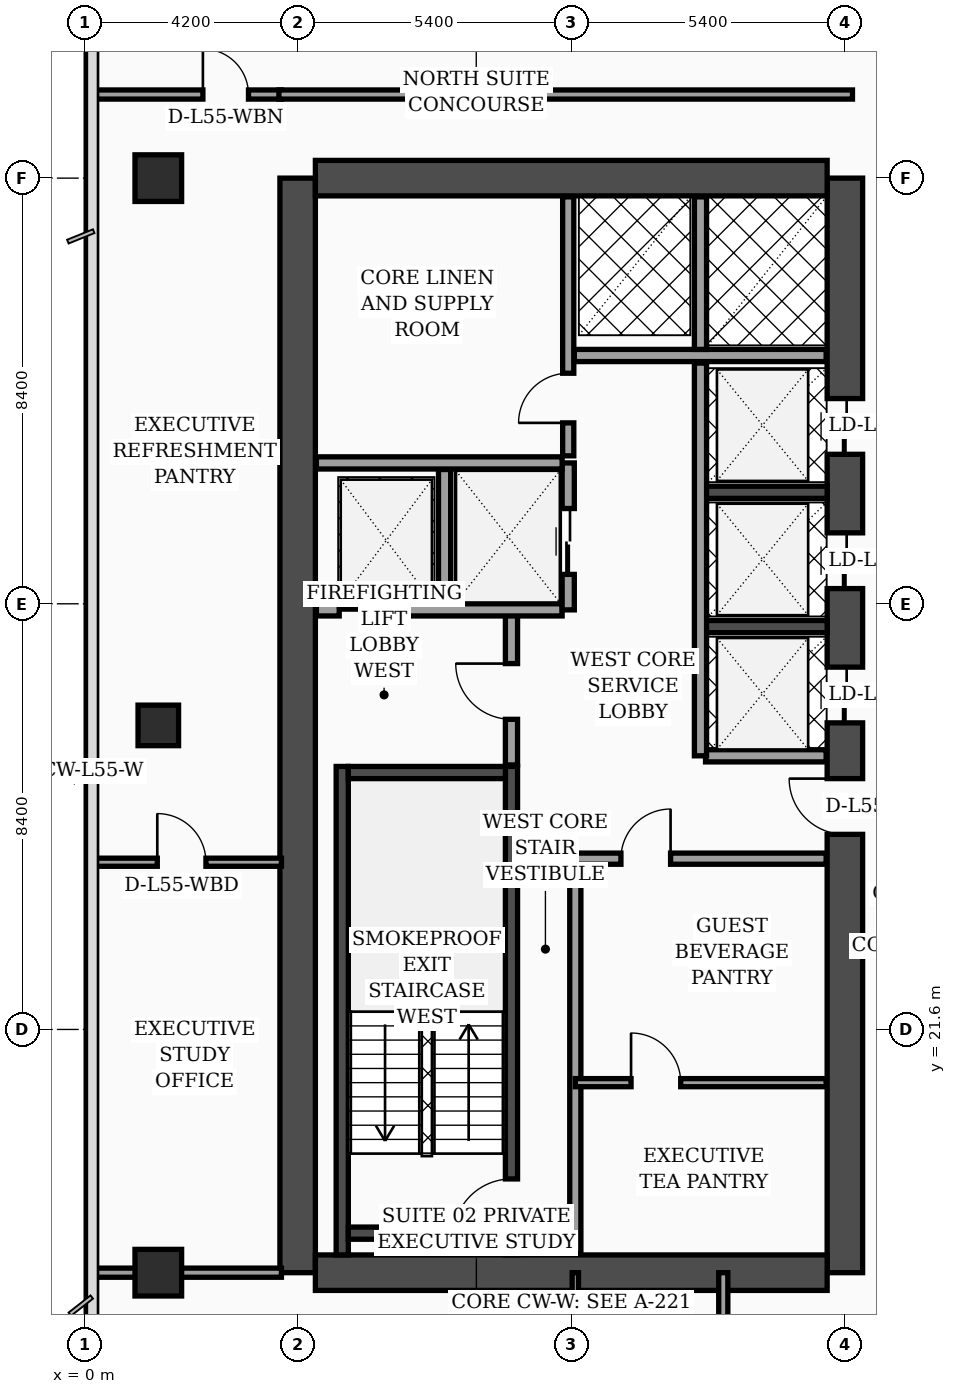
"""IFC4 building model, lengths in metres.
Left out: names, types, materials, properties, quantities, classifications, styles, units other than length and angle.
Written with IfcOpenShell. Run it as: python <this file> out.ifc"""

import sys

from ifc_helpers import new_model, si_unit, direction, frame, frame_2d, origin, origin_2d, place, context, subcontext, project, spatial, rectangle, extrude, element, fill, save


model = new_model("IFC4")
c1 = context("Model", 3, precision=1e-05, world=origin(), true_north=direction((0.0, 1.0)))
c2 = subcontext(c1, "Body", "Model", "MODEL_VIEW")
j1 = project(units=[si_unit("LENGTHUNIT", "METRE"), si_unit("PLANEANGLEUNIT", "RADIAN")], contexts=[c1])
p1 = place(None, origin())
s1 = spatial("IfcSite", under=j1, at=p1, CompositionType="ELEMENT")
p2 = place(p1, origin())
s2 = spatial("IfcBuilding", under=s1, at=p2, CompositionType="ELEMENT")
p3 = place(p2, frame((0.0, 0.0, 223.1)))
s3 = spatial("IfcBuildingStorey", under=s2, at=p3, CompositionType="ELEMENT", Elevation=223.1)
p4 = place(p3, frame((4.2, 16.8, 0.0), z_axis=(0.0, 0.0, 1.0), x_axis=(0.0, 1.0, 0.0)))
e1 = element("IfcWall", 1, at=p4, inside=s3, PredefinedType="SHEAR", context=c2, shape_type="SweptSolid", body=[
    extrude(rectangle(XDim=21.6, YDim=0.7, at=frame_2d((10.8, 0.0))), origin(), (0.0, 0.0, 1.0), 3.56),
])
p5 = place(p3, frame((15.0, 16.8, 0.0), z_axis=(0.0, 0.0, 1.0), x_axis=(0.0, 1.0, 0.0)))
e2 = element("IfcWall", 2, at=p5, inside=s3, PredefinedType="SHEAR", context=c2, shape_type="SweptSolid", body=[
    extrude(rectangle(XDim=21.6, YDim=0.7, at=frame_2d((10.8, 0.0))), origin(), (0.0, 0.0, 1.0), 3.56),
])
p6 = place(p5, frame((8.65, 0.0, 0.0)))
e3 = element("IfcOpeningElement", 3, at=p6, cuts=e2, PredefinedType="OPENING", context=c2, shape_type="SweptSolid", body=[
    extrude(rectangle(XDim=1.1, YDim=2.2, at=frame_2d((0.55, 1.1))), frame((0.0, 0.36, 0.0), z_axis=(0.0, -1.0, 0.0), x_axis=(1.0, 0.0, 0.0)), (0.0, 0.0, 1.0), 0.72),
])
p7 = place(p5, frame((10.85, 0.0, 0.0)))
e4 = element("IfcOpeningElement", 4, at=p7, cuts=e2, PredefinedType="OPENING", context=c2, shape_type="SweptSolid", body=[
    extrude(rectangle(XDim=1.1, YDim=2.2, at=frame_2d((0.55, 1.1))), frame((0.0, 0.36, 0.0), z_axis=(0.0, -1.0, 0.0), x_axis=(1.0, 0.0, 0.0)), (0.0, 0.0, 1.0), 0.72),
])
p8 = place(p5, frame((13.5, 0.0, 0.0)))
e5 = element("IfcOpeningElement", 5, at=p8, cuts=e2, PredefinedType="OPENING", context=c2, shape_type="SweptSolid", body=[
    extrude(rectangle(XDim=1.1, YDim=2.2, at=frame_2d((0.55, 1.1))), frame((0.0, 0.36, 0.0), z_axis=(0.0, -1.0, 0.0), x_axis=(1.0, 0.0, 0.0)), (0.0, 0.0, 1.0), 0.72),
])
p9 = place(p5, frame((16.15, 0.0, 0.0)))
e6 = element("IfcOpeningElement", 6, at=p9, cuts=e2, PredefinedType="OPENING", context=c2, shape_type="SweptSolid", body=[
    extrude(rectangle(XDim=1.1, YDim=2.2, at=frame_2d((0.55, 1.1))), frame((0.0, 0.36, 0.0), z_axis=(0.0, -1.0, 0.0), x_axis=(1.0, 0.0, 0.0)), (0.0, 0.0, 1.0), 0.72),
])
for number, where, z_axis, x_axis in (
    (7, (4.55, 38.4, 0.0), (0.0, 0.0, 1.0), (1.0, 0.0, 0.0)),
    (8, (4.55, 16.8, 0.0), (0.0, 0.0, 1.0), (1.0, 0.0, 0.0)),
):
    element("IfcWall", number, at=place(p3, frame(where, z_axis=z_axis, x_axis=x_axis)), inside=s3, PredefinedType="SHEAR", context=c2, shape_type="SweptSolid", body=[
        extrude(rectangle(XDim=10.1, YDim=0.7, at=frame_2d((5.05, 0.0))), origin(), (0.0, 0.0, 1.0), 3.56),
    ])
p10 = place(p3, frame((5.08, 17.15, 0.0), z_axis=(0.0, 0.0, 1.0), x_axis=(0.0, 1.0, 0.0)))
e9 = element("IfcWall", 9, at=p10, inside=s3, PredefinedType="SOLIDWALL", context=c2, shape_type="SweptSolid", body=[
    extrude(rectangle(XDim=9.64, YDim=0.24, at=frame_2d((4.82, 0.0))), origin(), (0.0, 0.0, 1.0), 3.56),
])
p11 = place(p3, frame((8.42, 17.15, 0.0), z_axis=(0.0, 0.0, 1.0), x_axis=(0.0, 1.0, 0.0)))
e10 = element("IfcWall", 10, at=p11, inside=s3, PredefinedType="SOLIDWALL", context=c2, shape_type="SweptSolid", body=[
    extrude(rectangle(XDim=9.64, YDim=0.24, at=frame_2d((4.82, 0.0))), origin(), (0.0, 0.0, 1.0), 3.56),
])
p12 = place(p11, frame((0.35, 0.0, 0.0)))
e11 = element("IfcOpeningElement", 11, at=p12, cuts=e10, PredefinedType="OPENING", context=c2, shape_type="SweptSolid", body=[
    extrude(rectangle(XDim=1.15, YDim=2.2, at=frame_2d((0.575, 1.1))), frame((0.0, 0.13, 0.0), z_axis=(0.0, -1.0, 0.0), x_axis=(1.0, 0.0, 0.0)), (0.0, 0.0, 1.0), 0.26),
])
for number, where, z_axis, x_axis in (
    (12, (5.2, 17.58, 0.0), (0.0, 0.0, 1.0), (1.0, 0.0, 0.0)),
    (13, (5.2, 26.67, 0.0), (0.0, 0.0, 1.0), (1.0, 0.0, 0.0)),
):
    element("IfcWall", number, at=place(p3, frame(where, z_axis=z_axis, x_axis=x_axis)), inside=s3, PredefinedType="SOLIDWALL", context=c2, shape_type="SweptSolid", body=[
        extrude(rectangle(XDim=3.1, YDim=0.24, at=frame_2d((1.55, 0.0))), origin(), (0.0, 0.0, 1.0), 3.56),
    ])
for number, where, z_axis, x_axis in (
    (14, (12.18, 29.55, 0.0), (0.0, 0.0, 1.0), (1.0, 0.0, 0.0)),
    (15, (12.18, 32.2, 0.0), (0.0, 0.0, 1.0), (1.0, 0.0, 0.0)),
):
    element("IfcWall", number, at=place(p3, frame(where, z_axis=z_axis, x_axis=x_axis)), inside=s3, PredefinedType="SOLIDWALL", context=c2, shape_type="SweptSolid", body=[
        extrude(rectangle(XDim=2.47, YDim=0.24, at=frame_2d((1.235, 0.0))), origin(), (0.0, 0.0, 1.0), 3.56),
    ])
p13 = place(p3, frame((1.45, 16.8, 0.0), z_axis=(0.0, 0.0, 1.0), x_axis=(1.0, 0.0, 0.0)))
e16 = element("IfcColumn", 16, at=p13, inside=s3, PredefinedType="COLUMN", context=c2, shape_type="SweptSolid", body=[
    extrude(rectangle(XDim=0.92, YDim=0.92, at=origin_2d()), origin(), (0.0, 0.0, 1.0), 3.56),
])
p14 = place(p3, frame((1.45, 27.6, 0.0), z_axis=(0.0, 0.0, 1.0), x_axis=(1.0, 0.0, 0.0)))
e17 = element("IfcColumn", 17, at=p14, inside=s3, PredefinedType="COLUMN", context=c2, shape_type="SweptSolid", body=[
    extrude(rectangle(XDim=0.8, YDim=0.8, at=origin_2d()), origin(), (0.0, 0.0, 1.0), 3.56),
])
p15 = place(p3, frame((1.45, 38.4, 0.0), z_axis=(0.0, 0.0, 1.0), x_axis=(1.0, 0.0, 0.0)))
e18 = element("IfcColumn", 18, at=p15, inside=s3, PredefinedType="COLUMN", context=c2, shape_type="SweptSolid", body=[
    extrude(rectangle(XDim=0.92, YDim=0.92, at=origin_2d()), origin(), (0.0, 0.0, 1.0), 3.56),
])
p16 = place(p3, frame((8.42, 26.82, 0.0), z_axis=(0.0, 0.0, 1.0), x_axis=(0.0, 1.0, 0.0)))
e19 = element("IfcWall", 19, at=p16, inside=s3, PredefinedType="SOLIDWALL", context=c2, shape_type="SweptSolid", body=[
    extrude(rectangle(XDim=3.0, YDim=0.24, at=frame_2d((1.5, 0.0))), origin(), (0.0, 0.0, 1.0), 3.56),
])
p17 = place(p16, frame((0.9, 0.0, 0.0)))
e20 = element("IfcOpeningElement", 20, at=p17, cuts=e19, PredefinedType="OPENING", context=c2, shape_type="SweptSolid", body=[
    extrude(rectangle(XDim=1.1, YDim=2.2, at=frame_2d((0.55, 1.1))), frame((0.0, 0.13, 0.0), z_axis=(0.0, -1.0, 0.0), x_axis=(1.0, 0.0, 0.0)), (0.0, 0.0, 1.0), 0.26),
])
p18 = place(p3, frame((4.57, 29.88, 0.0), z_axis=(0.0, 0.0, 1.0), x_axis=(1.0, 0.0, 0.0)))
e21 = element("IfcWall", 21, at=p18, inside=s3, PredefinedType="SOLIDWALL", context=c2, shape_type="SweptSolid", body=[
    extrude(rectangle(XDim=4.85, YDim=0.24, at=frame_2d((2.425, 0.0))), origin(), (0.0, 0.0, 1.0), 3.56),
])
p19 = place(p18, frame((0.45, 0.0, 0.0)))
e22 = element("IfcOpeningElement", 22, at=p19, cuts=e21, PredefinedType="OPENING", context=c2, shape_type="SweptSolid", body=[
    extrude(rectangle(XDim=1.3, YDim=2.35, at=frame_2d((0.65, 1.175))), frame((0.0, 0.13, 0.0), z_axis=(0.0, -1.0, 0.0), x_axis=(1.0, 0.0, 0.0)), (0.0, 0.0, 1.0), 0.26),
])
p20 = place(p3, frame((7.1, 30.02, 0.0), z_axis=(0.0, 0.0, 1.0), x_axis=(0.0, 1.0, 0.0)))
e23 = element("IfcWall", 23, at=p20, inside=s3, PredefinedType="SOLIDWALL", context=c2, shape_type="SweptSolid", body=[
    extrude(rectangle(XDim=2.63, YDim=0.24, at=frame_2d((1.315, 0.0))), origin(), (0.0, 0.0, 1.0), 3.56),
])
p21 = place(p3, frame((9.54, 29.88, 0.0), z_axis=(0.0, 0.0, 1.0), x_axis=(0.0, 1.0, 0.0)))
e24 = element("IfcWall", 24, at=p21, inside=s3, PredefinedType="SOLIDWALL", context=c2, shape_type="SweptSolid", body=[
    extrude(rectangle(XDim=2.9, YDim=0.24, at=frame_2d((1.45, 0.0))), origin(), (0.0, 0.0, 1.0), 3.56),
])
p22 = place(p21, frame((0.7, 0.0, 0.0)))
e25 = element("IfcOpeningElement", 25, at=p22, cuts=e24, PredefinedType="OPENING", context=c2, shape_type="SweptSolid", body=[
    extrude(rectangle(XDim=1.3, YDim=2.35, at=frame_2d((0.65, 1.175))), frame((0.0, 0.13, 0.0), z_axis=(0.0, -1.0, 0.0), x_axis=(1.0, 0.0, 0.0)), (0.0, 0.0, 1.0), 0.26),
])
p23 = place(p3, frame((4.57, 32.78, 0.0), z_axis=(0.0, 0.0, 1.0), x_axis=(1.0, 0.0, 0.0)))
e26 = element("IfcWall", 26, at=p23, inside=s3, PredefinedType="SOLIDWALL", context=c2, shape_type="SweptSolid", body=[
    extrude(rectangle(XDim=4.85, YDim=0.24, at=frame_2d((2.425, 0.0))), origin(), (0.0, 0.0, 1.0), 3.19),
])
p24 = place(p3, frame((9.68, 17.17, 0.0), z_axis=(0.0, 0.0, 1.0), x_axis=(0.0, 1.0, 0.0)))
e27 = element("IfcWall", 27, at=p24, inside=s3, PredefinedType="SOLIDWALL", context=c2, shape_type="SweptSolid", body=[
    extrude(rectangle(XDim=7.83, YDim=0.22, at=frame_2d((3.915, 0.0))), origin(), (0.0, 0.0, 1.0), 3.56),
])
p25 = place(p3, frame((9.54, 32.92, 0.0), z_axis=(0.0, 0.0, 1.0), x_axis=(0.0, 1.0, 0.0)))
e28 = element("IfcWall", 28, at=p25, inside=s3, PredefinedType="SOLIDWALL", context=c2, shape_type="SweptSolid", body=[
    extrude(rectangle(XDim=5.11, YDim=0.22, at=frame_2d((2.555, 0.0))), origin(), (0.0, 0.0, 1.0), 3.56),
])
p26 = place(p25, frame((0.65, 0.0, 0.0)))
e29 = element("IfcOpeningElement", 29, at=p26, cuts=e28, PredefinedType="OPENING", context=c2, shape_type="SweptSolid", body=[
    extrude(rectangle(XDim=0.98, YDim=2.15, at=frame_2d((0.49, 1.075))), frame((0.0, 0.12, 0.0), z_axis=(0.0, -1.0, 0.0), x_axis=(1.0, 0.0, 0.0)), (0.0, 0.0, 1.0), 0.24),
])
p27 = place(p3, frame((9.68, 20.55, 0.0), z_axis=(0.0, 0.0, 1.0), x_axis=(1.0, 0.0, 0.0)))
e30 = element("IfcWall", 30, at=p27, inside=s3, PredefinedType="PARTITIONING", context=c2, shape_type="SweptSolid", body=[
    extrude(rectangle(XDim=4.95, YDim=0.16, at=frame_2d((2.475, 0.0))), origin(), (0.0, 0.0, 1.0), 3.56),
])
p28 = place(p27, frame((1.1, 0.0, 0.0)))
e31 = element("IfcOpeningElement", 31, at=p28, cuts=e30, PredefinedType="OPENING", context=c2, shape_type="SweptSolid", body=[
    extrude(rectangle(XDim=0.98, YDim=2.15, at=frame_2d((0.49, 1.075))), frame((0.0, 0.09, 0.0), z_axis=(0.0, -1.0, 0.0), x_axis=(1.0, 0.0, 0.0)), (0.0, 0.0, 1.0), 0.18),
])
p29 = place(p3, frame((9.68, 24.97, 0.0), z_axis=(0.0, 0.0, 1.0), x_axis=(1.0, 0.0, 0.0)))
e32 = element("IfcWall", 32, at=p29, inside=s3, PredefinedType="SOLIDWALL", context=c2, shape_type="SweptSolid", body=[
    extrude(rectangle(XDim=4.95, YDim=0.22, at=frame_2d((2.475, 0.0))), origin(), (0.0, 0.0, 1.0), 2.94),
])
p30 = place(p29, frame((0.9, 0.0, 0.0)))
e33 = element("IfcOpeningElement", 33, at=p30, cuts=e32, PredefinedType="OPENING", context=c2, shape_type="SweptSolid", body=[
    extrude(rectangle(XDim=0.98, YDim=2.15, at=frame_2d((0.49, 1.075))), frame((0.0, 0.12, 0.0), z_axis=(0.0, -1.0, 0.0), x_axis=(1.0, 0.0, 0.0)), (0.0, 0.0, 1.0), 0.24),
])
p31 = place(p3, frame((12.25, 27.0, 0.0), z_axis=(0.0, 0.0, 1.0), x_axis=(1.0, 0.0, 0.0)))
e34 = element("IfcWall", 34, at=p31, inside=s3, PredefinedType="SOLIDWALL", context=c2, shape_type="SweptSolid", body=[
    extrude(rectangle(XDim=2.38, YDim=0.24, at=frame_2d((1.19, 0.0))), origin(), (0.0, 0.0, 1.0), 3.56),
])
p32 = place(p3, frame((12.15, 27.0, 0.0), z_axis=(0.0, 0.0, 1.0), x_axis=(0.0, 1.0, 0.0)))
e35 = element("IfcWall", 35, at=p32, inside=s3, PredefinedType="SOLIDWALL", context=c2, shape_type="SweptSolid", body=[
    extrude(rectangle(XDim=7.75, YDim=0.24, at=frame_2d((3.875, 0.0))), origin(), (0.0, 0.0, 1.0), 3.56),
])
p33 = place(p3, frame((9.66, 34.9, 0.0), z_axis=(0.0, 0.0, 1.0), x_axis=(1.0, 0.0, 0.0)))
e36 = element("IfcWall", 36, at=p33, inside=s3, PredefinedType="SOLIDWALL", context=c2, shape_type="SweptSolid", body=[
    extrude(rectangle(XDim=4.97, YDim=0.24, at=frame_2d((2.485, 0.0))), origin(), (0.0, 0.0, 1.0), 3.56),
])
p34 = place(p3, frame((12.15, 35.02, 0.0), z_axis=(0.0, 0.0, 1.0), x_axis=(0.0, 1.0, 0.0)))
e37 = element("IfcWall", 37, at=p34, inside=s3, PredefinedType="SOLIDWALL", context=c2, shape_type="SweptSolid", body=[
    extrude(rectangle(XDim=3.01, YDim=0.24, at=frame_2d((1.505, 0.0))), origin(), (0.0, 0.0, 1.0), 3.56),
])
p35 = place(p3, frame((0.08, 24.9, 0.0), z_axis=(0.0, 0.0, 1.0), x_axis=(1.0, 0.0, 0.0)))
e38 = element("IfcWall", 38, at=p35, inside=s3, PredefinedType="PARTITIONING", context=c2, shape_type="SweptSolid", body=[
    extrude(rectangle(XDim=3.8, YDim=0.16, at=frame_2d((1.9, 0.0))), origin(), (0.0, 0.0, 1.0), 3.09),
])
p36 = place(p35, frame((1.35, 0.0, 0.0)))
e39 = element("IfcOpeningElement", 39, at=p36, cuts=e38, PredefinedType="OPENING", context=c2, shape_type="SweptSolid", body=[
    extrude(rectangle(XDim=0.96, YDim=2.2, at=frame_2d((0.48, 1.1))), frame((0.0, 0.09, 0.0), z_axis=(0.0, -1.0, 0.0), x_axis=(1.0, 0.0, 0.0)), (0.0, 0.0, 1.0), 0.18),
])
p37 = place(p3, frame((0.08, 16.8, 0.0), z_axis=(0.0, 0.0, 1.0), x_axis=(1.0, 0.0, 0.0)))
e40 = element("IfcWall", 40, at=p37, inside=s3, PredefinedType="PARTITIONING", context=c2, shape_type="SweptSolid", body=[
    extrude(rectangle(XDim=3.8, YDim=0.18, at=frame_2d((1.9, 0.0))), origin(), (0.0, 0.0, 1.0), 2.94),
])
p38 = place(p3, frame((0.08, 40.05, 0.0), z_axis=(0.0, 0.0, 1.0), x_axis=(1.0, 0.0, 0.0)))
e41 = element("IfcWall", 41, at=p38, inside=s3, PredefinedType="PARTITIONING", context=c2, shape_type="SweptSolid", body=[
    extrude(rectangle(XDim=3.8, YDim=0.18, at=frame_2d((1.9, 0.0))), origin(), (0.0, 0.0, 1.0), 2.94),
])
p39 = place(p38, frame((2.25, 0.0, 0.0)))
e42 = element("IfcOpeningElement", 42, at=p39, cuts=e41, PredefinedType="OPENING", context=c2, shape_type="SweptSolid", body=[
    extrude(rectangle(XDim=0.9, YDim=2.15, at=frame_2d((0.45, 1.075))), frame((0.0, 0.1, 0.0), z_axis=(0.0, -1.0, 0.0), x_axis=(1.0, 0.0, 0.0)), (0.0, 0.0, 1.0), 0.2),
])
p40 = place(p3, frame((9.68, 14.75, 0.0), z_axis=(0.0, 0.0, 1.0), x_axis=(0.0, 1.0, 0.0)))
e43 = element("IfcWall", 43, at=p40, inside=s3, PredefinedType="PARTITIONING", context=c2, shape_type="SweptSolid", body=[
    extrude(rectangle(XDim=2.05, YDim=0.125, at=frame_2d((1.025, 0.0))), origin(), (0.0, 0.0, 1.0), 3.56),
])
p41 = place(p3, frame((12.6, 2.44, 0.0), z_axis=(0.0, 0.0, 1.0), x_axis=(0.0, 1.0, 0.0)))
e44 = element("IfcWall", 44, at=p41, inside=s3, PredefinedType="PARTITIONING", context=c2, shape_type="SweptSolid", body=[
    extrude(rectangle(XDim=14.36, YDim=0.18, at=frame_2d((7.18, 0.0))), origin(), (0.0, 0.0, 1.0), 2.94),
])
p42 = place(p41, frame((3.01, 0.0, 0.0)))
e45 = element("IfcOpeningElement", 45, at=p42, cuts=e44, PredefinedType="OPENING", context=c2, shape_type="SweptSolid", body=[
    extrude(rectangle(XDim=1.02, YDim=2.2, at=frame_2d((0.51, 1.1))), frame((0.0, 0.1, 0.0), z_axis=(0.0, -1.0, 0.0), x_axis=(1.0, 0.0, 0.0)), (0.0, 0.0, 1.0), 0.2),
])
p43 = place(p41, frame((10.1, 0.0, 0.0)))
e46 = element("IfcOpeningElement", 46, at=p43, cuts=e44, PredefinedType="OPENING", context=c2, shape_type="SweptSolid", body=[
    extrude(rectangle(XDim=1.02, YDim=2.2, at=frame_2d((0.51, 1.1))), frame((0.0, 0.1, 0.0), z_axis=(0.0, -1.0, 0.0), x_axis=(1.0, 0.0, 0.0)), (0.0, 0.0, 1.0), 0.2),
])
p44 = place(p3, frame((3.83, 40.05, 0.0), z_axis=(0.0, 0.0, 1.0), x_axis=(1.0, 0.0, 0.0)))
e47 = element("IfcWall", 47, at=p44, inside=s3, PredefinedType="PARTITIONING", context=c2, shape_type="SweptSolid", body=[
    extrude(rectangle(XDim=11.32, YDim=0.18, at=frame_2d((5.66, 0.0))), origin(), (0.0, 0.0, 1.0), 2.94),
])
p45 = place(p17, origin())
e48 = element("IfcDoor", 48, at=p45, inside=s3, OperationType="SINGLE_SWING_RIGHT", PredefinedType="DOOR", context=c2, shape_type="SweptSolid", body=[
    extrude(rectangle(XDim=1.1, YDim=2.2, at=frame_2d((0.55, 1.1))), frame((0.0, 0.025, 0.0), z_axis=(0.0, -1.0, 0.0), x_axis=(1.0, 0.0, 0.0)), (0.0, 0.0, 1.0), 0.05),
])
fill(e20, e48)
p46 = place(p19, origin())
e49 = element("IfcDoor", 49, at=p46, inside=s3, OperationType="DOUBLE_DOOR_SLIDING", PredefinedType="DOOR", context=c2, shape_type="SweptSolid", body=[
    extrude(rectangle(XDim=1.3, YDim=2.35, at=frame_2d((0.65, 1.175))), frame((0.0, 0.025, 0.0), z_axis=(0.0, -1.0, 0.0), x_axis=(1.0, 0.0, 0.0)), (0.0, 0.0, 1.0), 0.05),
])
fill(e22, e49)
p47 = place(p22, origin())
e50 = element("IfcDoor", 50, at=p47, inside=s3, OperationType="DOUBLE_DOOR_SLIDING", PredefinedType="DOOR", context=c2, shape_type="SweptSolid", body=[
    extrude(rectangle(XDim=1.3, YDim=2.35, at=frame_2d((0.65, 1.175))), frame((0.0, 0.025, 0.0), z_axis=(0.0, -1.0, 0.0), x_axis=(1.0, 0.0, 0.0)), (0.0, 0.0, 1.0), 0.05),
])
fill(e25, e50)
p48 = place(p26, origin())
e51 = element("IfcDoor", 51, at=p48, inside=s3, OperationType="SINGLE_SWING_LEFT", PredefinedType="DOOR", context=c2, shape_type="SweptSolid", body=[
    extrude(rectangle(XDim=0.98, YDim=2.15, at=frame_2d((0.49, 1.075))), frame((0.0, 0.025, 0.0), z_axis=(0.0, -1.0, 0.0), x_axis=(1.0, 0.0, 0.0)), (0.0, 0.0, 1.0), 0.05),
])
fill(e29, e51)
p49 = place(p28, origin())
e52 = element("IfcDoor", 52, at=p49, inside=s3, OperationType="SINGLE_SWING_LEFT", PredefinedType="DOOR", context=c2, shape_type="SweptSolid", body=[
    extrude(rectangle(XDim=0.98, YDim=2.15, at=frame_2d((0.49, 1.075))), frame((0.0, 0.025, 0.0), z_axis=(0.0, -1.0, 0.0), x_axis=(1.0, 0.0, 0.0)), (0.0, 0.0, 1.0), 0.05),
])
fill(e31, e52)
p50 = place(p30, origin())
e53 = element("IfcDoor", 53, at=p50, inside=s3, OperationType="SINGLE_SWING_RIGHT", PredefinedType="DOOR", context=c2, shape_type="SweptSolid", body=[
    extrude(rectangle(XDim=0.98, YDim=2.15, at=frame_2d((0.49, 1.075))), frame((0.0, 0.025, 0.0), z_axis=(0.0, -1.0, 0.0), x_axis=(1.0, 0.0, 0.0)), (0.0, 0.0, 1.0), 0.05),
])
fill(e33, e53)
p51 = place(p36, origin())
e54 = element("IfcDoor", 54, at=p51, inside=s3, OperationType="SINGLE_SWING_LEFT", PredefinedType="DOOR", context=c2, shape_type="SweptSolid", body=[
    extrude(rectangle(XDim=0.96, YDim=2.2, at=frame_2d((0.48, 1.1))), frame((0.0, 0.025, 0.0), z_axis=(0.0, -1.0, 0.0), x_axis=(1.0, 0.0, 0.0)), (0.0, 0.0, 1.0), 0.05),
])
fill(e39, e54)
p52 = place(p39, origin())
e55 = element("IfcDoor", 55, at=p52, inside=s3, OperationType="SINGLE_SWING_LEFT", PredefinedType="DOOR", context=c2, shape_type="SweptSolid", body=[
    extrude(rectangle(XDim=0.9, YDim=2.15, at=frame_2d((0.45, 1.075))), frame((0.0, 0.025, 0.0), z_axis=(0.0, -1.0, 0.0), x_axis=(1.0, 0.0, 0.0)), (0.0, 0.0, 1.0), 0.05),
])
fill(e42, e55)
p53 = place(p12, origin())
e56 = element("IfcDoor", 56, at=p53, inside=s3, OperationType="SINGLE_SWING_LEFT", PredefinedType="DOOR", context=c2, shape_type="SweptSolid", body=[
    extrude(rectangle(XDim=1.15, YDim=2.2, at=frame_2d((0.575, 1.1))), frame((0.0, 0.025, 0.0), z_axis=(0.0, -1.0, 0.0), x_axis=(1.0, 0.0, 0.0)), (0.0, 0.0, 1.0), 0.05),
])
fill(e11, e56)
p54 = place(p6, origin())
e57 = element("IfcDoor", 57, at=p54, inside=s3, OperationType="SINGLE_SWING_RIGHT", PredefinedType="DOOR", context=c2, shape_type="SweptSolid", body=[
    extrude(rectangle(XDim=1.1, YDim=2.2, at=frame_2d((0.55, 1.1))), frame((0.0, 0.025, 0.0), z_axis=(0.0, -1.0, 0.0), x_axis=(1.0, 0.0, 0.0)), (0.0, 0.0, 1.0), 0.05),
])
fill(e3, e57)
p55 = place(p7, origin())
e58 = element("IfcDoor", 58, at=p55, inside=s3, OperationType="DOUBLE_DOOR_SLIDING", PredefinedType="DOOR", context=c2, shape_type="SweptSolid", body=[
    extrude(rectangle(XDim=1.1, YDim=2.2, at=frame_2d((0.55, 1.1))), frame((0.0, 0.025, 0.0), z_axis=(0.0, -1.0, 0.0), x_axis=(1.0, 0.0, 0.0)), (0.0, 0.0, 1.0), 0.05),
])
fill(e4, e58)
p56 = place(p8, origin())
e59 = element("IfcDoor", 59, at=p56, inside=s3, OperationType="DOUBLE_DOOR_SLIDING", PredefinedType="DOOR", context=c2, shape_type="SweptSolid", body=[
    extrude(rectangle(XDim=1.1, YDim=2.2, at=frame_2d((0.55, 1.1))), frame((0.0, 0.025, 0.0), z_axis=(0.0, -1.0, 0.0), x_axis=(1.0, 0.0, 0.0)), (0.0, 0.0, 1.0), 0.05),
])
fill(e5, e59)
p57 = place(p9, origin())
e60 = element("IfcDoor", 60, at=p57, inside=s3, OperationType="DOUBLE_DOOR_SLIDING", PredefinedType="DOOR", context=c2, shape_type="SweptSolid", body=[
    extrude(rectangle(XDim=1.1, YDim=2.2, at=frame_2d((0.55, 1.1))), frame((0.0, 0.025, 0.0), z_axis=(0.0, -1.0, 0.0), x_axis=(1.0, 0.0, 0.0)), (0.0, 0.0, 1.0), 0.05),
])
fill(e6, e60)
save(model, sys.argv[1])
